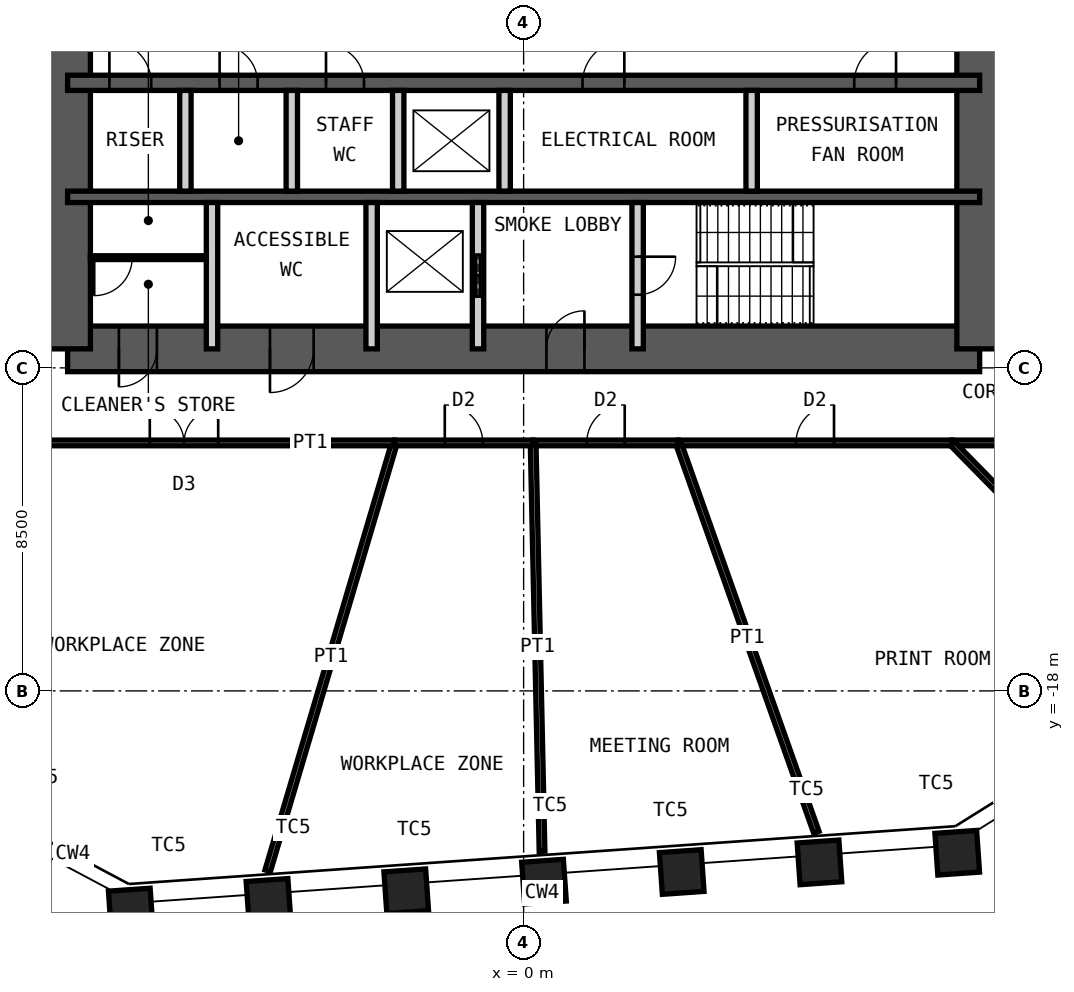
"""IFC4 building model, lengths in metres.
Left out: names, types, materials, properties, quantities, classifications, styles, units other than length and angle.
Written with IfcOpenShell. Run it as: python <this file> out.ifc"""

import sys

from ifc_helpers import new_model, si_unit, direction, frame, frame_2d, origin, origin_2d, place, context, subcontext, project, spatial, rectangle, hollow_rectangle, extrude, element, fill, save


model = new_model("IFC4")
c1 = context("Model", 3, precision=1e-05, world=origin(), true_north=direction((0.0, 1.0)))
c2 = subcontext(c1, "Body", "Model", "MODEL_VIEW")
j1 = project(units=[si_unit("LENGTHUNIT", "METRE"), si_unit("PLANEANGLEUNIT", "RADIAN")], contexts=[c1])
p1 = place(None, origin())
s1 = spatial("IfcSite", under=j1, at=p1, CompositionType="ELEMENT")
p2 = place(p1, origin())
s2 = spatial("IfcBuilding", under=s1, at=p2, CompositionType="ELEMENT")
p3 = place(p2, frame((0.0, 0.0, 214.0)))
s3 = spatial("IfcBuildingStorey", under=s2, at=p3, CompositionType="ELEMENT", Elevation=214.0)
for number, where, z_axis, x_axis in (
    (1, (11.41, -22.258, 0.0), (0.0, 0.0, 1.0), (0.998, 0.07, 0.0)),
    (2, (7.785, -22.512, 0.0), (0.0, 0.0, 1.0), (0.998, 0.07, 0.0)),
    (3, (4.16, -22.765, 0.0), (0.0, 0.0, 1.0), (0.998, 0.07, 0.0)),
    (4, (0.536, -23.019, 0.0), (0.0, 0.0, 1.0), (0.998, 0.07, 0.0)),
    (5, (-3.089, -23.272, 0.0), (0.0, 0.0, 1.0), (0.998, 0.07, 0.0)),
    (6, (-6.714, -23.526, 0.0), (0.0, 0.0, 1.0), (0.998, 0.07, 0.0)),
    (7, (-10.338, -23.779, 0.0), (0.0, 0.0, 1.0), (0.998, 0.07, 0.0)),
):
    element("IfcColumn", number, at=place(p3, frame(where, z_axis=z_axis, x_axis=x_axis)), inside=s3, PredefinedType="COLUMN", context=c2, shape_type="SweptSolid", body=[
        extrude(hollow_rectangle(XDim=1.1, YDim=1.1, WallThickness=0.07, at=origin_2d()), origin(), (0.0, 0.0, 1.0), 4.2),
    ])
p4 = place(p3, frame((-12.0, -9.0, 0.0), z_axis=(0.0, 0.0, 1.0), x_axis=(1.0, 0.0, 0.0)))
e8 = element("IfcWall", 8, at=p4, inside=s3, PredefinedType="SHEAR", context=c2, shape_type="SweptSolid", body=[
    extrude(rectangle(XDim=24.0, YDim=1.2, at=frame_2d((12.0, 0.0))), origin(), (0.0, 0.0, 1.0), 4.2),
])
p5 = place(p4, frame((1.35, 0.0, 0.0)))
e9 = element("IfcOpeningElement", 9, at=p5, cuts=e8, PredefinedType="OPENING", context=c2, shape_type="SweptSolid", body=[
    extrude(rectangle(XDim=1.0, YDim=2.1, at=frame_2d((0.5, 1.05))), frame((0.0, 0.61, 0.0), z_axis=(0.0, -1.0, 0.0), x_axis=(1.0, 0.0, 0.0)), (0.0, 0.0, 1.0), 1.22),
])
p6 = place(p4, frame((5.325, 0.0, 0.0)))
e10 = element("IfcOpeningElement", 10, at=p6, cuts=e8, PredefinedType="OPENING", context=c2, shape_type="SweptSolid", body=[
    extrude(rectangle(XDim=1.15, YDim=2.1, at=frame_2d((0.575, 1.05))), frame((0.0, 0.61, 0.0), z_axis=(0.0, -1.0, 0.0), x_axis=(1.0, 0.0, 0.0)), (0.0, 0.0, 1.0), 1.22),
])
p7 = place(p4, frame((12.6, 0.0, 0.0)))
e11 = element("IfcOpeningElement", 11, at=p7, cuts=e8, PredefinedType="OPENING", context=c2, shape_type="SweptSolid", body=[
    extrude(rectangle(XDim=1.0, YDim=2.1, at=frame_2d((0.5, 1.05))), frame((0.0, 0.61, 0.0), z_axis=(0.0, -1.0, 0.0), x_axis=(1.0, 0.0, 0.0)), (0.0, 0.0, 1.0), 1.22),
])
p8 = place(p3, frame((12.0, -9.0, 0.0), z_axis=(0.0, 0.0, 1.0), x_axis=(0.0, 1.0, 0.0)))
e12 = element("IfcWall", 12, at=p8, inside=s3, PredefinedType="SHEAR", context=c2, shape_type="SweptSolid", body=[
    extrude(rectangle(XDim=18.0, YDim=1.2, at=frame_2d((9.0, 0.0))), origin(), (0.0, 0.0, 1.0), 4.2),
])
p9 = place(p8, frame((8.1, 0.0, 0.0)))
e13 = element("IfcOpeningElement", 13, at=p9, cuts=e12, PredefinedType="OPENING", context=c2, shape_type="SweptSolid", body=[
    extrude(rectangle(XDim=1.8, YDim=2.1, at=frame_2d((0.9, 1.05))), frame((0.0, 0.61, 0.0), z_axis=(0.0, -1.0, 0.0), x_axis=(1.0, 0.0, 0.0)), (0.0, 0.0, 1.0), 1.22),
])
p10 = place(p3, frame((-12.0, -9.0, 0.0), z_axis=(0.0, 0.0, 1.0), x_axis=(0.0, 1.0, 0.0)))
e14 = element("IfcWall", 14, at=p10, inside=s3, PredefinedType="SHEAR", context=c2, shape_type="SweptSolid", body=[
    extrude(rectangle(XDim=18.0, YDim=1.2, at=frame_2d((9.0, 0.0))), origin(), (0.0, 0.0, 1.0), 4.2),
])
p11 = place(p10, frame((8.1, 0.0, 0.0)))
e15 = element("IfcOpeningElement", 15, at=p11, cuts=e14, PredefinedType="OPENING", context=c2, shape_type="SweptSolid", body=[
    extrude(rectangle(XDim=1.8, YDim=2.1, at=frame_2d((0.9, 1.05))), frame((0.0, 0.61, 0.0), z_axis=(0.0, -1.0, 0.0), x_axis=(1.0, 0.0, 0.0)), (0.0, 0.0, 1.0), 1.22),
])
p12 = place(p3, frame((-12.0, -2.0, 0.0), z_axis=(0.0, 0.0, 1.0), x_axis=(1.0, 0.0, 0.0)))
e16 = element("IfcWall", 16, at=p12, inside=s3, PredefinedType="SHEAR", context=c2, shape_type="SweptSolid", body=[
    extrude(rectangle(XDim=24.0, YDim=0.4, at=frame_2d((12.0, 0.0))), origin(), (0.0, 0.0, 1.0), 4.2),
])
p13 = place(p12, frame((1.1, 0.0, 0.0)))
e17 = element("IfcOpeningElement", 17, at=p13, cuts=e16, PredefinedType="OPENING", context=c2, shape_type="SweptSolid", body=[
    extrude(rectangle(XDim=1.1, YDim=2.1, at=frame_2d((0.55, 1.05))), frame((0.0, 0.21, 0.0), z_axis=(0.0, -1.0, 0.0), x_axis=(1.0, 0.0, 0.0)), (0.0, 0.0, 1.0), 0.42),
])
p14 = place(p12, frame((13.55, 0.0, 0.0)))
e18 = element("IfcOpeningElement", 18, at=p14, cuts=e16, PredefinedType="OPENING", context=c2, shape_type="SweptSolid", body=[
    extrude(rectangle(XDim=1.1, YDim=2.1, at=frame_2d((0.55, 1.05))), frame((0.0, 0.21, 0.0), z_axis=(0.0, -1.0, 0.0), x_axis=(1.0, 0.0, 0.0)), (0.0, 0.0, 1.0), 0.42),
])
p15 = place(p12, frame((20.7, 0.0, 0.0)))
e19 = element("IfcOpeningElement", 19, at=p15, cuts=e16, PredefinedType="OPENING", context=c2, shape_type="SweptSolid", body=[
    extrude(rectangle(XDim=1.1, YDim=2.1, at=frame_2d((0.55, 1.05))), frame((0.0, 0.21, 0.0), z_axis=(0.0, -1.0, 0.0), x_axis=(1.0, 0.0, 0.0)), (0.0, 0.0, 1.0), 0.42),
])
p16 = place(p12, frame((4.0, 0.0, 0.0)))
e20 = element("IfcOpeningElement", 20, at=p16, cuts=e16, PredefinedType="OPENING", context=c2, shape_type="SweptSolid", body=[
    extrude(rectangle(XDim=1.0, YDim=2.1, at=frame_2d((0.5, 1.05))), frame((0.0, 0.21, 0.0), z_axis=(0.0, -1.0, 0.0), x_axis=(1.0, 0.0, 0.0)), (0.0, 0.0, 1.0), 0.42),
])
p17 = place(p12, frame((6.8, 0.0, 0.0)))
e21 = element("IfcOpeningElement", 21, at=p17, cuts=e16, PredefinedType="OPENING", context=c2, shape_type="SweptSolid", body=[
    extrude(rectangle(XDim=1.0, YDim=2.1, at=frame_2d((0.5, 1.05))), frame((0.0, 0.21, 0.0), z_axis=(0.0, -1.0, 0.0), x_axis=(1.0, 0.0, 0.0)), (0.0, 0.0, 1.0), 0.42),
])
p18 = place(p3, frame((-12.0, -5.0, 0.0), z_axis=(0.0, 0.0, 1.0), x_axis=(1.0, 0.0, 0.0)))
e22 = element("IfcWall", 22, at=p18, inside=s3, PredefinedType="SHEAR", context=c2, shape_type="SweptSolid", body=[
    extrude(rectangle(XDim=24.0, YDim=0.3, at=frame_2d((12.0, 0.0))), origin(), (0.0, 0.0, 1.0), 4.2),
])
for number, where, z_axis, x_axis in (
    (23, (-8.9, -4.85, 0.0), (0.0, 0.0, 1.0), (0.0, 1.0, 0.0)),
    (24, (-6.1, -4.85, 0.0), (0.0, 0.0, 1.0), (0.0, 1.0, 0.0)),
    (25, (-3.3, -4.85, 0.0), (0.0, 0.0, 1.0), (0.0, 1.0, 0.0)),
    (26, (-0.5, -4.85, 0.0), (0.0, 0.0, 1.0), (0.0, 1.0, 0.0)),
    (27, (6.0, -4.85, 0.0), (0.0, 0.0, 1.0), (0.0, 1.0, 0.0)),
):
    element("IfcWall", number, at=place(p3, frame(where, z_axis=z_axis, x_axis=x_axis)), inside=s3, PredefinedType="PARTITIONING", context=c2, shape_type="SweptSolid", body=[
        extrude(rectangle(XDim=2.65, YDim=0.3, at=frame_2d((1.325, 0.0))), origin(), (0.0, 0.0, 1.0), 3.98),
    ])
for number, where, z_axis, x_axis in (
    (28, (-8.2, -9.0, 0.0), (0.0, 0.0, 1.0), (0.0, 1.0, 0.0)),
    (29, (-4.0, -9.0, 0.0), (0.0, 0.0, 1.0), (0.0, 1.0, 0.0)),
):
    element("IfcWall", number, at=place(p3, frame(where, z_axis=z_axis, x_axis=x_axis)), inside=s3, PredefinedType="PARTITIONING", context=c2, shape_type="SweptSolid", body=[
        extrude(rectangle(XDim=3.85, YDim=0.3, at=frame_2d((1.925, 0.0))), origin(), (0.0, 0.0, 1.0), 3.98),
    ])
p19 = place(p3, frame((-1.2, -9.0, 0.0), z_axis=(0.0, 0.0, 1.0), x_axis=(0.0, 1.0, 0.0)))
e30 = element("IfcWall", 30, at=p19, inside=s3, PredefinedType="PARTITIONING", context=c2, shape_type="SweptSolid", body=[
    extrude(rectangle(XDim=3.85, YDim=0.3, at=frame_2d((1.925, 0.0))), origin(), (0.0, 0.0, 1.0), 3.98),
])
p20 = place(p19, frame((1.375, 0.0, 0.0)))
e31 = element("IfcOpeningElement", 31, at=p20, cuts=e30, PredefinedType="OPENING", context=c2, shape_type="SweptSolid", body=[
    extrude(rectangle(XDim=1.1, YDim=2.4, at=frame_2d((0.55, 1.2))), frame((0.0, 0.16, 0.0), z_axis=(0.0, -1.0, 0.0), x_axis=(1.0, 0.0, 0.0)), (0.0, 0.0, 1.0), 0.32),
])
p21 = place(p3, frame((3.0, -9.0, 0.0), z_axis=(0.0, 0.0, 1.0), x_axis=(0.0, 1.0, 0.0)))
e32 = element("IfcWall", 32, at=p21, inside=s3, PredefinedType="PARTITIONING", context=c2, shape_type="SweptSolid", body=[
    extrude(rectangle(XDim=3.85, YDim=0.3, at=frame_2d((1.925, 0.0))), origin(), (0.0, 0.0, 1.0), 3.98),
])
p22 = place(p21, frame((1.425, 0.0, 0.0)))
e33 = element("IfcOpeningElement", 33, at=p22, cuts=e32, PredefinedType="OPENING", context=c2, shape_type="SweptSolid", body=[
    extrude(rectangle(XDim=1.0, YDim=2.1, at=frame_2d((0.5, 1.05))), frame((0.0, 0.16, 0.0), z_axis=(0.0, -1.0, 0.0), x_axis=(1.0, 0.0, 0.0)), (0.0, 0.0, 1.0), 0.32),
])
p23 = place(p3, frame((-11.4, -6.6, 0.0), z_axis=(0.0, 0.0, 1.0), x_axis=(1.0, 0.0, 0.0)))
e34 = element("IfcWall", 34, at=p23, inside=s3, PredefinedType="PARTITIONING", context=c2, shape_type="SweptSolid", body=[
    extrude(rectangle(XDim=3.05, YDim=0.1, at=frame_2d((1.525, 0.0))), origin(), (0.0, 0.0, 1.0), 3.98),
])
p24 = place(p23, frame((0.1, 0.0, 0.0)))
e35 = element("IfcOpeningElement", 35, at=p24, cuts=e34, PredefinedType="OPENING", context=c2, shape_type="SweptSolid", body=[
    extrude(rectangle(XDim=1.0, YDim=2.4, at=frame_2d((0.5, 1.2))), frame((0.0, 0.06, 0.0), z_axis=(0.0, -1.0, 0.0), x_axis=(1.0, 0.0, 0.0)), (0.0, 0.0, 1.0), 0.12),
])
p25 = place(p3, frame((-6.734, -22.731, 0.0), z_axis=(0.0, 0.0, 1.0), x_axis=(0.284049386564, 0.958809650553, 0.0)))
e36 = element("IfcWall", 36, at=p25, inside=s3, PredefinedType="PARTITIONING", context=c2, shape_type="SweptSolid", body=[
    extrude(rectangle(XDim=11.74, YDim=0.15, at=frame_2d((5.87, 0.0))), origin(), (0.0, 0.0, 1.0), 3.33),
])
p26 = place(p3, frame((-3.399, -11.475, 0.0), z_axis=(0.0, 0.0, 1.0), x_axis=(-1.0, 0.0, 0.0)))
e37 = element("IfcWall", 37, at=p26, inside=s3, PredefinedType="PARTITIONING", context=c2, shape_type="SweptSolid", body=[
    extrude(rectangle(XDim=11.076, YDim=0.15, at=frame_2d((5.538, 0.0))), origin(), (0.0, 0.0, 1.0), 4.03),
])
p27 = place(p26, frame((4.638, 0.0, 0.0)))
e38 = element("IfcOpeningElement", 38, at=p27, cuts=e37, PredefinedType="OPENING", context=c2, shape_type="SweptSolid", body=[
    extrude(rectangle(XDim=1.8, YDim=2.4, at=frame_2d((0.9, 1.2))), frame((0.0, 0.085, 0.0), z_axis=(0.0, -1.0, 0.0), x_axis=(1.0, 0.0, 0.0)), (0.0, 0.0, 1.0), 0.17),
])
p28 = place(p3, frame((14.475, -11.475, 0.0), z_axis=(0.0, 0.0, 1.0), x_axis=(-1.0, 0.0, 0.0)))
e39 = element("IfcWall", 39, at=p28, inside=s3, PredefinedType="PARTITIONING", context=c2, shape_type="SweptSolid", body=[
    extrude(rectangle(XDim=3.209, YDim=0.15, at=frame_2d((1.605, 0.0))), origin(), (0.0, 0.0, 1.0), 4.03),
])
p29 = place(p3, frame((16.145, -16.444, 0.0), z_axis=(0.0, 0.0, 1.0), x_axis=(-0.700591378209, 0.71356269576, 0.0)))
e40 = element("IfcWall", 40, at=p29, inside=s3, PredefinedType="PARTITIONING", context=c2, shape_type="SweptSolid", body=[
    extrude(rectangle(XDim=6.964, YDim=0.15, at=frame_2d((3.482, 0.0))), origin(), (0.0, 0.0, 1.0), 3.43),
])
p30 = place(p3, frame((11.266, -11.475, 0.0), z_axis=(0.0, 0.0, 1.0), x_axis=(-1.0, 0.0, 0.0)))
e41 = element("IfcWall", 41, at=p30, inside=s3, PredefinedType="PARTITIONING", context=c2, shape_type="SweptSolid", body=[
    extrude(rectangle(XDim=7.196, YDim=0.15, at=frame_2d((3.598, 0.0))), origin(), (0.0, 0.0, 1.0), 4.03),
])
p31 = place(p30, frame((3.098, 0.0, 0.0)))
e42 = element("IfcOpeningElement", 42, at=p31, cuts=e41, PredefinedType="OPENING", context=c2, shape_type="SweptSolid", body=[
    extrude(rectangle(XDim=1.0, YDim=2.4, at=frame_2d((0.5, 1.2))), frame((0.0, 0.085, 0.0), z_axis=(0.0, -1.0, 0.0), x_axis=(1.0, 0.0, 0.0)), (0.0, 0.0, 1.0), 0.17),
])
p32 = place(p3, frame((7.703, -21.719, 0.0), z_axis=(0.0, 0.0, 1.0), x_axis=(-0.334269551553, 0.942477515331, 0.0)))
e43 = element("IfcWall", 43, at=p32, inside=s3, PredefinedType="PARTITIONING", context=c2, shape_type="SweptSolid", body=[
    extrude(rectangle(XDim=10.869, YDim=0.15, at=frame_2d((5.435, 0.0))), origin(), (0.0, 0.0, 1.0), 3.43),
])
p33 = place(p3, frame((4.07, -11.475, 0.0), z_axis=(0.0, 0.0, 1.0), x_axis=(-1.0, 0.0, 0.0)))
e44 = element("IfcWall", 44, at=p33, inside=s3, PredefinedType="PARTITIONING", context=c2, shape_type="SweptSolid", body=[
    extrude(rectangle(XDim=3.819, YDim=0.15, at=frame_2d((1.91, 0.0))), origin(), (0.0, 0.0, 1.0), 4.03),
])
p34 = place(p33, frame((1.41, 0.0, 0.0)))
e45 = element("IfcOpeningElement", 45, at=p34, cuts=e44, PredefinedType="OPENING", context=c2, shape_type="SweptSolid", body=[
    extrude(rectangle(XDim=1.0, YDim=2.4, at=frame_2d((0.5, 1.2))), frame((0.0, 0.085, 0.0), z_axis=(0.0, -1.0, 0.0), x_axis=(1.0, 0.0, 0.0)), (0.0, 0.0, 1.0), 0.17),
])
p35 = place(p3, frame((0.485, -22.22, 0.0), z_axis=(0.0, 0.0, 1.0), x_axis=(-0.021806550804, 0.999762208899, 0.0)))
e46 = element("IfcWall", 46, at=p35, inside=s3, PredefinedType="PARTITIONING", context=c2, shape_type="SweptSolid", body=[
    extrude(rectangle(XDim=10.748, YDim=0.15, at=frame_2d((5.374, 0.0))), origin(), (0.0, 0.0, 1.0), 3.43),
])
p36 = place(p3, frame((0.25, -11.475, 0.0), z_axis=(0.0, 0.0, 1.0), x_axis=(-1.0, 0.0, 0.0)))
e47 = element("IfcWall", 47, at=p36, inside=s3, PredefinedType="PARTITIONING", context=c2, shape_type="SweptSolid", body=[
    extrude(rectangle(XDim=3.65, YDim=0.15, at=frame_2d((1.825, 0.0))), origin(), (0.0, 0.0, 1.0), 4.03),
])
p37 = place(p36, frame((1.325, 0.0, 0.0)))
e48 = element("IfcOpeningElement", 48, at=p37, cuts=e47, PredefinedType="OPENING", context=c2, shape_type="SweptSolid", body=[
    extrude(rectangle(XDim=1.0, YDim=2.4, at=frame_2d((0.5, 1.2))), frame((0.0, 0.085, 0.0), z_axis=(0.0, -1.0, 0.0), x_axis=(1.0, 0.0, 0.0)), (0.0, 0.0, 1.0), 0.17),
])
p38 = place(p5, origin())
e49 = element("IfcDoor", 49, at=p38, inside=s3, OperationType="SINGLE_SWING_LEFT", PredefinedType="DOOR", context=c2, shape_type="SweptSolid", body=[
    extrude(rectangle(XDim=1.0, YDim=2.1, at=frame_2d((0.5, 1.05))), frame((0.0, 0.025, 0.0), z_axis=(0.0, -1.0, 0.0), x_axis=(1.0, 0.0, 0.0)), (0.0, 0.0, 1.0), 0.05),
])
fill(e9, e49)
p39 = place(p6, origin())
e50 = element("IfcDoor", 50, at=p39, inside=s3, OperationType="SINGLE_SWING_LEFT", PredefinedType="DOOR", context=c2, shape_type="SweptSolid", body=[
    extrude(rectangle(XDim=1.15, YDim=2.1, at=frame_2d((0.575, 1.05))), frame((0.0, 0.025, 0.0), z_axis=(0.0, -1.0, 0.0), x_axis=(1.0, 0.0, 0.0)), (0.0, 0.0, 1.0), 0.05),
])
fill(e10, e50)
p40 = place(p7, origin())
e51 = element("IfcDoor", 51, at=p40, inside=s3, OperationType="SINGLE_SWING_LEFT", PredefinedType="DOOR", context=c2, shape_type="SweptSolid", body=[
    extrude(rectangle(XDim=1.0, YDim=2.1, at=frame_2d((0.5, 1.05))), frame((0.0, 0.025, 0.0), z_axis=(0.0, -1.0, 0.0), x_axis=(1.0, 0.0, 0.0)), (0.0, 0.0, 1.0), 0.05),
])
fill(e11, e51)
p41 = place(p22, origin())
e52 = element("IfcDoor", 52, at=p41, inside=s3, OperationType="SINGLE_SWING_RIGHT", PredefinedType="DOOR", context=c2, shape_type="SweptSolid", body=[
    extrude(rectangle(XDim=1.0, YDim=2.1, at=frame_2d((0.5, 1.05))), frame((0.0, 0.025, 0.0), z_axis=(0.0, -1.0, 0.0), x_axis=(1.0, 0.0, 0.0)), (0.0, 0.0, 1.0), 0.05),
])
fill(e33, e52)
p42 = place(p13, origin())
e53 = element("IfcDoor", 53, at=p42, inside=s3, OperationType="SINGLE_SWING_RIGHT", PredefinedType="DOOR", context=c2, shape_type="SweptSolid", body=[
    extrude(rectangle(XDim=1.1, YDim=2.1, at=frame_2d((0.55, 1.05))), frame((0.0, 0.025, 0.0), z_axis=(0.0, -1.0, 0.0), x_axis=(1.0, 0.0, 0.0)), (0.0, 0.0, 1.0), 0.05),
])
fill(e17, e53)
p43 = place(p14, origin())
e54 = element("IfcDoor", 54, at=p43, inside=s3, OperationType="SINGLE_SWING_LEFT", PredefinedType="DOOR", context=c2, shape_type="SweptSolid", body=[
    extrude(rectangle(XDim=1.1, YDim=2.1, at=frame_2d((0.55, 1.05))), frame((0.0, 0.025, 0.0), z_axis=(0.0, -1.0, 0.0), x_axis=(1.0, 0.0, 0.0)), (0.0, 0.0, 1.0), 0.05),
])
fill(e18, e54)
p44 = place(p15, origin())
e55 = element("IfcDoor", 55, at=p44, inside=s3, OperationType="SINGLE_SWING_LEFT", PredefinedType="DOOR", context=c2, shape_type="SweptSolid", body=[
    extrude(rectangle(XDim=1.1, YDim=2.1, at=frame_2d((0.55, 1.05))), frame((0.0, 0.025, 0.0), z_axis=(0.0, -1.0, 0.0), x_axis=(1.0, 0.0, 0.0)), (0.0, 0.0, 1.0), 0.05),
])
fill(e19, e55)
p45 = place(p20, origin())
e56 = element("IfcDoor", 56, at=p45, inside=s3, OperationType="DOUBLE_DOOR_SLIDING", PredefinedType="DOOR", context=c2, shape_type="SweptSolid", body=[
    extrude(rectangle(XDim=1.1, YDim=2.4, at=frame_2d((0.55, 1.2))), frame((0.0, 0.025, 0.0), z_axis=(0.0, -1.0, 0.0), x_axis=(1.0, 0.0, 0.0)), (0.0, 0.0, 1.0), 0.05),
])
fill(e31, e56)
p46 = place(p16, origin())
e57 = element("IfcDoor", 57, at=p46, inside=s3, OperationType="SINGLE_SWING_RIGHT", PredefinedType="DOOR", context=c2, shape_type="SweptSolid", body=[
    extrude(rectangle(XDim=1.0, YDim=2.1, at=frame_2d((0.5, 1.05))), frame((0.0, 0.025, 0.0), z_axis=(0.0, -1.0, 0.0), x_axis=(1.0, 0.0, 0.0)), (0.0, 0.0, 1.0), 0.05),
])
fill(e20, e57)
p47 = place(p17, origin())
e58 = element("IfcDoor", 58, at=p47, inside=s3, OperationType="SINGLE_SWING_RIGHT", PredefinedType="DOOR", context=c2, shape_type="SweptSolid", body=[
    extrude(rectangle(XDim=1.0, YDim=2.1, at=frame_2d((0.5, 1.05))), frame((0.0, 0.025, 0.0), z_axis=(0.0, -1.0, 0.0), x_axis=(1.0, 0.0, 0.0)), (0.0, 0.0, 1.0), 0.05),
])
fill(e21, e58)
p48 = place(p24, origin())
e59 = element("IfcDoor", 59, at=p48, inside=s3, OperationType="SINGLE_SWING_LEFT", PredefinedType="DOOR", context=c2, shape_type="SweptSolid", body=[
    extrude(rectangle(XDim=1.0, YDim=2.4, at=frame_2d((0.5, 1.2))), frame((0.0, 0.025, 0.0), z_axis=(0.0, -1.0, 0.0), x_axis=(1.0, 0.0, 0.0)), (0.0, 0.0, 1.0), 0.05),
])
fill(e35, e59)
p49 = place(p27, origin())
e60 = element("IfcDoor", 60, at=p49, inside=s3, OperationType="DOUBLE_DOOR_DOUBLE_SWING", PredefinedType="DOOR", context=c2, shape_type="SweptSolid", body=[
    extrude(rectangle(XDim=1.8, YDim=2.4, at=frame_2d((0.9, 1.2))), frame((0.0, 0.025, 0.0), z_axis=(0.0, -1.0, 0.0), x_axis=(1.0, 0.0, 0.0)), (0.0, 0.0, 1.0), 0.05),
])
fill(e38, e60)
p50 = place(p31, origin())
e61 = element("IfcDoor", 61, at=p50, inside=s3, OperationType="SINGLE_SWING_LEFT", PredefinedType="DOOR", context=c2, shape_type="SweptSolid", body=[
    extrude(rectangle(XDim=1.0, YDim=2.4, at=frame_2d((0.5, 1.2))), frame((0.0, 0.025, 0.0), z_axis=(0.0, -1.0, 0.0), x_axis=(1.0, 0.0, 0.0)), (0.0, 0.0, 1.0), 0.05),
])
fill(e42, e61)
p51 = place(p34, origin())
e62 = element("IfcDoor", 62, at=p51, inside=s3, OperationType="SINGLE_SWING_LEFT", PredefinedType="DOOR", context=c2, shape_type="SweptSolid", body=[
    extrude(rectangle(XDim=1.0, YDim=2.4, at=frame_2d((0.5, 1.2))), frame((0.0, 0.025, 0.0), z_axis=(0.0, -1.0, 0.0), x_axis=(1.0, 0.0, 0.0)), (0.0, 0.0, 1.0), 0.05),
])
fill(e45, e62)
p52 = place(p37, origin())
e63 = element("IfcDoor", 63, at=p52, inside=s3, OperationType="SINGLE_SWING_RIGHT", PredefinedType="DOOR", context=c2, shape_type="SweptSolid", body=[
    extrude(rectangle(XDim=1.0, YDim=2.4, at=frame_2d((0.5, 1.2))), frame((0.0, 0.025, 0.0), z_axis=(0.0, -1.0, 0.0), x_axis=(1.0, 0.0, 0.0)), (0.0, 0.0, 1.0), 0.05),
])
fill(e48, e63)
save(model, sys.argv[1])
